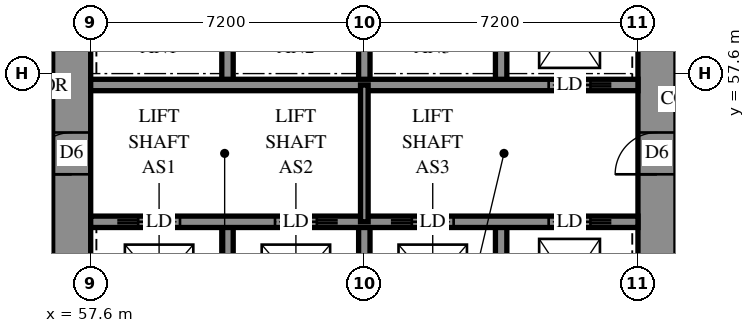
"""IFC4 building model, lengths in metres.
Left out: names, types, materials, properties, quantities, classifications, styles, units other than length and angle.
Written with IfcOpenShell. Run it as: python <this file> out.ifc"""

import sys

from ifc_helpers import new_model, si_unit, direction, frame, frame_2d, origin, place, context, subcontext, project, spatial, rectangle, extrude, element, fill, save


model = new_model("IFC4")
c1 = context("Model", 3, precision=1e-05, world=origin(), true_north=direction((0.0, 1.0)))
c2 = subcontext(c1, "Body", "Model", "MODEL_VIEW")
j1 = project(units=[si_unit("LENGTHUNIT", "METRE"), si_unit("PLANEANGLEUNIT", "RADIAN")], contexts=[c1])
p1 = place(None, origin())
s1 = spatial("IfcSite", under=j1, at=p1, CompositionType="ELEMENT")
p2 = place(p1, origin())
s2 = spatial("IfcBuilding", under=s1, at=p2, CompositionType="ELEMENT")
p3 = place(p2, frame((0.0, 0.0, 14.4)))
s3 = spatial("IfcBuildingStorey", under=s2, at=p3, CompositionType="ELEMENT", Elevation=14.4)
p4 = place(p3, frame((57.1, 50.4, -0.4), z_axis=(0.0, 0.0, 1.0), x_axis=(0.0, 1.0, 0.0)))
e1 = element("IfcWall", 1, at=p4, inside=s3, PredefinedType="SHEAR", context=c2, shape_type="SweptSolid", body=[
    extrude(rectangle(XDim=14.4, YDim=1.0, at=frame_2d((7.2, 0.0))), origin(), (0.0, 0.0, 1.0), 3.5),
])
p5 = place(p4, frame((4.55, 0.0, 0.4)))
e2 = element("IfcOpeningElement", 2, at=p5, cuts=e1, PredefinedType="OPENING", context=c2, shape_type="SweptSolid", body=[
    extrude(rectangle(XDim=1.1, YDim=2.1, at=frame_2d((0.55, 1.05))), frame((0.0, 0.51, 0.0), z_axis=(0.0, -1.0, 0.0), x_axis=(1.0, 0.0, 0.0)), (0.0, 0.0, 1.0), 1.02),
])
p6 = place(p4, frame((11.35, 0.0, 0.4)))
e3 = element("IfcOpeningElement", 3, at=p6, cuts=e1, PredefinedType="OPENING", context=c2, shape_type="SweptSolid", body=[
    extrude(rectangle(XDim=1.1, YDim=2.1, at=frame_2d((0.55, 1.05))), frame((0.0, 0.51, 0.0), z_axis=(0.0, -1.0, 0.0), x_axis=(1.0, 0.0, 0.0)), (0.0, 0.0, 1.0), 1.02),
])
p7 = place(p3, frame((72.5, 50.4, -0.4), z_axis=(0.0, 0.0, 1.0), x_axis=(0.0, 1.0, 0.0)))
e4 = element("IfcWall", 4, at=p7, inside=s3, PredefinedType="SHEAR", context=c2, shape_type="SweptSolid", body=[
    extrude(rectangle(XDim=14.4, YDim=1.0, at=frame_2d((7.2, 0.0))), origin(), (0.0, 0.0, 1.0), 3.5),
])
p8 = place(p7, frame((4.55, 0.0, 0.4)))
e5 = element("IfcOpeningElement", 5, at=p8, cuts=e4, PredefinedType="OPENING", context=c2, shape_type="SweptSolid", body=[
    extrude(rectangle(XDim=1.1, YDim=2.1, at=frame_2d((0.55, 1.05))), frame((0.0, 0.51, 0.0), z_axis=(0.0, -1.0, 0.0), x_axis=(1.0, 0.0, 0.0)), (0.0, 0.0, 1.0), 1.02),
])
p9 = place(p7, frame((11.35, 0.0, 0.4)))
e6 = element("IfcOpeningElement", 6, at=p9, cuts=e4, PredefinedType="OPENING", context=c2, shape_type="SweptSolid", body=[
    extrude(rectangle(XDim=1.1, YDim=2.1, at=frame_2d((0.55, 1.05))), frame((0.0, 0.51, 0.0), z_axis=(0.0, -1.0, 0.0), x_axis=(1.0, 0.0, 0.0)), (0.0, 0.0, 1.0), 1.02),
])
for number, where, z_axis, x_axis in (
    (7, (61.2, 50.4, 0.0), (0.0, 0.0, 1.0), (0.0, 1.0, 0.0)),
    (8, (61.2, 57.3, 0.0), (0.0, 0.0, 1.0), (0.0, 1.0, 0.0)),
    (9, (64.8, 50.4, 0.0), (0.0, 0.0, 1.0), (0.0, 1.0, 0.0)),
    (10, (64.8, 57.3, 0.0), (0.0, 0.0, 1.0), (0.0, 1.0, 0.0)),
    (11, (68.4, 50.4, 0.0), (0.0, 0.0, 1.0), (0.0, 1.0, 0.0)),
    (12, (68.4, 57.3, 0.0), (0.0, 0.0, 1.0), (0.0, 1.0, 0.0)),
):
    element("IfcWall", number, at=place(p3, frame(where, z_axis=z_axis, x_axis=x_axis)), inside=s3, PredefinedType="SOLIDWALL", context=c2, shape_type="SweptSolid", body=[
        extrude(rectangle(XDim=3.3, YDim=0.3, at=frame_2d((1.65, 0.0))), origin(), (0.0, 0.0, 1.0), 3.8),
    ])
p10 = place(p3, frame((57.6, 53.7, 0.0), z_axis=(0.0, 0.0, 1.0), x_axis=(1.0, 0.0, 0.0)))
e13 = element("IfcWall", 13, at=p10, inside=s3, PredefinedType="SOLIDWALL", context=c2, shape_type="SweptSolid", body=[
    extrude(rectangle(XDim=14.4, YDim=0.3, at=frame_2d((7.2, 0.0))), origin(), (0.0, 0.0, 1.0), 3.8),
])
p11 = place(p10, frame((1.25, 0.0, 0.0)))
e14 = element("IfcOpeningElement", 14, at=p11, cuts=e13, PredefinedType="OPENING", context=c2, shape_type="SweptSolid", body=[
    extrude(rectangle(XDim=1.1, YDim=2.1, at=frame_2d((0.55, 1.05))), frame((0.0, 0.16, 0.0), z_axis=(0.0, -1.0, 0.0), x_axis=(1.0, 0.0, 0.0)), (0.0, 0.0, 1.0), 0.32),
])
p12 = place(p10, frame((4.85, 0.0, 0.0)))
e15 = element("IfcOpeningElement", 15, at=p12, cuts=e13, PredefinedType="OPENING", context=c2, shape_type="SweptSolid", body=[
    extrude(rectangle(XDim=1.1, YDim=2.1, at=frame_2d((0.55, 1.05))), frame((0.0, 0.16, 0.0), z_axis=(0.0, -1.0, 0.0), x_axis=(1.0, 0.0, 0.0)), (0.0, 0.0, 1.0), 0.32),
])
p13 = place(p10, frame((8.45, 0.0, 0.0)))
e16 = element("IfcOpeningElement", 16, at=p13, cuts=e13, PredefinedType="OPENING", context=c2, shape_type="SweptSolid", body=[
    extrude(rectangle(XDim=1.1, YDim=2.1, at=frame_2d((0.55, 1.05))), frame((0.0, 0.16, 0.0), z_axis=(0.0, -1.0, 0.0), x_axis=(1.0, 0.0, 0.0)), (0.0, 0.0, 1.0), 0.32),
])
p14 = place(p10, frame((12.05, 0.0, 0.0)))
e17 = element("IfcOpeningElement", 17, at=p14, cuts=e13, PredefinedType="OPENING", context=c2, shape_type="SweptSolid", body=[
    extrude(rectangle(XDim=1.1, YDim=2.1, at=frame_2d((0.55, 1.05))), frame((0.0, 0.16, 0.0), z_axis=(0.0, -1.0, 0.0), x_axis=(1.0, 0.0, 0.0)), (0.0, 0.0, 1.0), 0.32),
])
p15 = place(p3, frame((57.6, 57.3, 0.0), z_axis=(0.0, 0.0, 1.0), x_axis=(1.0, 0.0, 0.0)))
e18 = element("IfcWall", 18, at=p15, inside=s3, PredefinedType="SOLIDWALL", context=c2, shape_type="SweptSolid", body=[
    extrude(rectangle(XDim=14.4, YDim=0.3, at=frame_2d((7.2, 0.0))), origin(), (0.0, 0.0, 1.0), 3.8),
])
p16 = place(p15, frame((12.05, 0.0, 0.0)))
e19 = element("IfcOpeningElement", 19, at=p16, cuts=e18, PredefinedType="OPENING", context=c2, shape_type="SweptSolid", body=[
    extrude(rectangle(XDim=1.1, YDim=2.1, at=frame_2d((0.55, 1.05))), frame((0.0, 0.16, 0.0), z_axis=(0.0, -1.0, 0.0), x_axis=(1.0, 0.0, 0.0)), (0.0, 0.0, 1.0), 0.32),
])
p17 = place(p3, frame((64.8, 53.7, 0.0), z_axis=(0.0, 0.0, 1.0), x_axis=(0.0, 1.0, 0.0)))
e20 = element("IfcWall", 20, at=p17, inside=s3, PredefinedType="PARTITIONING", context=c2, shape_type="SweptSolid", body=[
    extrude(rectangle(XDim=3.6, YDim=0.2, at=frame_2d((1.8, 0.0))), origin(), (0.0, 0.0, 1.0), 3.8),
])
p18 = place(p5, origin())
e21 = element("IfcDoor", 21, at=p18, inside=s3, OperationType="DOUBLE_DOOR_SINGLE_SWING", PredefinedType="DOOR", context=c2, shape_type="SweptSolid", body=[
    extrude(rectangle(XDim=1.1, YDim=2.1, at=frame_2d((0.55, 1.05))), frame((0.0, 0.025, 0.0), z_axis=(0.0, -1.0, 0.0), x_axis=(1.0, 0.0, 0.0)), (0.0, 0.0, 1.0), 0.05),
])
fill(e2, e21)
p19 = place(p8, origin())
e22 = element("IfcDoor", 22, at=p19, inside=s3, OperationType="DOUBLE_DOOR_SINGLE_SWING", PredefinedType="DOOR", context=c2, shape_type="SweptSolid", body=[
    extrude(rectangle(XDim=1.1, YDim=2.1, at=frame_2d((0.55, 1.05))), frame((0.0, 0.025, 0.0), z_axis=(0.0, -1.0, 0.0), x_axis=(1.0, 0.0, 0.0)), (0.0, 0.0, 1.0), 0.05),
])
fill(e5, e22)
p20 = place(p11, origin())
e23 = element("IfcDoor", 23, at=p20, inside=s3, OperationType="SLIDING_TO_LEFT", PredefinedType="DOOR", context=c2, shape_type="SweptSolid", body=[
    extrude(rectangle(XDim=1.1, YDim=2.1, at=frame_2d((0.55, 1.05))), frame((0.0, 0.025, 0.0), z_axis=(0.0, -1.0, 0.0), x_axis=(1.0, 0.0, 0.0)), (0.0, 0.0, 1.0), 0.05),
])
fill(e14, e23)
p21 = place(p12, origin())
e24 = element("IfcDoor", 24, at=p21, inside=s3, OperationType="SLIDING_TO_RIGHT", PredefinedType="DOOR", context=c2, shape_type="SweptSolid", body=[
    extrude(rectangle(XDim=1.1, YDim=2.1, at=frame_2d((0.55, 1.05))), frame((0.0, 0.025, 0.0), z_axis=(0.0, -1.0, 0.0), x_axis=(1.0, 0.0, 0.0)), (0.0, 0.0, 1.0), 0.05),
])
fill(e15, e24)
p22 = place(p13, origin())
e25 = element("IfcDoor", 25, at=p22, inside=s3, OperationType="SLIDING_TO_LEFT", PredefinedType="DOOR", context=c2, shape_type="SweptSolid", body=[
    extrude(rectangle(XDim=1.1, YDim=2.1, at=frame_2d((0.55, 1.05))), frame((0.0, 0.025, 0.0), z_axis=(0.0, -1.0, 0.0), x_axis=(1.0, 0.0, 0.0)), (0.0, 0.0, 1.0), 0.05),
])
fill(e16, e25)
p23 = place(p14, origin())
e26 = element("IfcDoor", 26, at=p23, inside=s3, OperationType="SLIDING_TO_RIGHT", PredefinedType="DOOR", context=c2, shape_type="SweptSolid", body=[
    extrude(rectangle(XDim=1.1, YDim=2.1, at=frame_2d((0.55, 1.05))), frame((0.0, 0.025, 0.0), z_axis=(0.0, -1.0, 0.0), x_axis=(1.0, 0.0, 0.0)), (0.0, 0.0, 1.0), 0.05),
])
fill(e17, e26)
p24 = place(p16, origin())
e27 = element("IfcDoor", 27, at=p24, inside=s3, OperationType="SLIDING_TO_RIGHT", PredefinedType="DOOR", context=c2, shape_type="SweptSolid", body=[
    extrude(rectangle(XDim=1.1, YDim=2.1, at=frame_2d((0.55, 1.05))), frame((0.0, 0.025, 0.0), z_axis=(0.0, -1.0, 0.0), x_axis=(1.0, 0.0, 0.0)), (0.0, 0.0, 1.0), 0.05),
])
fill(e19, e27)
save(model, sys.argv[1])
